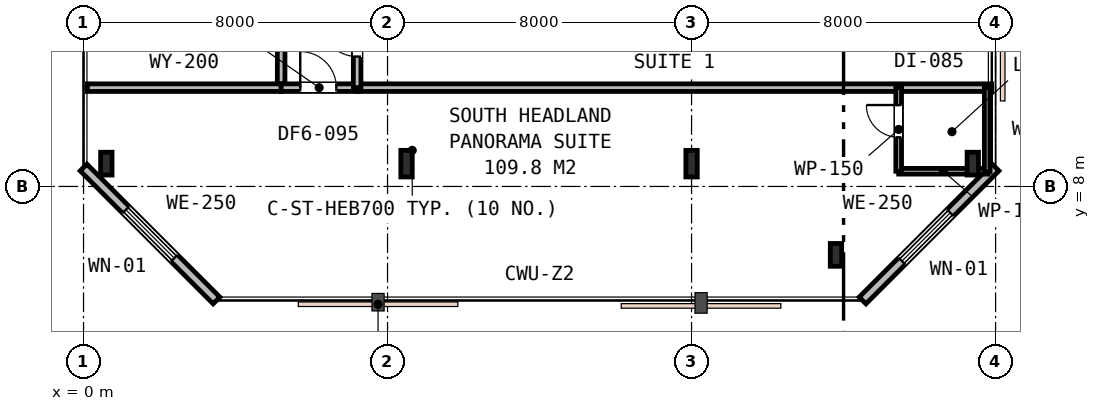
"""IFC4 building model, lengths in metres.
Left out: names, types, materials, properties, quantities, classifications, styles, units other than length and angle.
Written with IfcOpenShell. Run it as: python <this file> out.ifc"""

import sys

from ifc_helpers import new_model, si_unit, direction, frame, frame_2d, origin, origin_2d, place, context, subcontext, project, spatial, rectangle, i_section, extrude, element, fill, save


model = new_model("IFC4")
c1 = context("Model", 3, precision=1e-05, world=origin(), true_north=direction((0.0, 1.0)))
c2 = subcontext(c1, "Body", "Model", "MODEL_VIEW")
j1 = project(units=[si_unit("LENGTHUNIT", "METRE"), si_unit("PLANEANGLEUNIT", "RADIAN")], contexts=[c1])
p1 = place(None, origin())
s1 = spatial("IfcSite", under=j1, at=p1, CompositionType="ELEMENT")
p2 = place(p1, origin())
s2 = spatial("IfcBuilding", under=s1, at=p2, CompositionType="ELEMENT")
p3 = place(p2, frame((0.0, 0.0, 122.4)))
s3 = spatial("IfcBuildingStorey", under=s2, at=p3, CompositionType="ELEMENT", Elevation=122.4)
for number, where, z_axis, x_axis in (
    (1, (0.6, 8.6, 0.0), (0.0, 0.0, 1.0), (1.0, 0.0, 0.0)),
    (2, (19.8, 6.2, 0.0), (0.0, 0.0, 1.0), (1.0, 0.0, 0.0)),
    (3, (23.4, 8.6, 0.0), (0.0, 0.0, 1.0), (1.0, 0.0, 0.0)),
):
    element("IfcColumn", number, at=place(p3, frame(where, z_axis=z_axis, x_axis=x_axis)), inside=s3, PredefinedType="COLUMN", context=c2, shape_type="SweptSolid", body=[
        extrude(i_section(OverallWidth=0.3, OverallDepth=0.6, WebThickness=0.015, FlangeThickness=0.03, FilletRadius=0.027, at=origin_2d()), origin(), (0.0, 0.0, 1.0), 3.6),
    ])
for number, where, z_axis, x_axis in (
    (4, (8.5, 8.6, 0.0), (0.0, 0.0, 1.0), (1.0, 0.0, 0.0)),
    (5, (16.0, 8.6, 0.0), (0.0, 0.0, 1.0), (1.0, 0.0, 0.0)),
):
    element("IfcColumn", number, at=place(p3, frame(where, z_axis=z_axis, x_axis=x_axis)), inside=s3, PredefinedType="COLUMN", context=c2, shape_type="SweptSolid", body=[
        extrude(i_section(OverallWidth=0.3, OverallDepth=0.7, WebThickness=0.017, FlangeThickness=0.032, FilletRadius=0.027, at=origin_2d()), origin(), (0.0, 0.0, 1.0), 3.6),
    ])
p4 = place(p3, frame((20.5, 5.0, 0.0), z_axis=(0.0, 0.0, 1.0), x_axis=(0.707106781187, 0.707106781187, 0.0)))
e6 = element("IfcWall", 6, at=p4, inside=s3, PredefinedType="STANDARD", context=c2, shape_type="SweptSolid", body=[
    extrude(rectangle(XDim=4.95, YDim=0.25, at=frame_2d((2.475, 0.0))), origin(), (0.0, 0.0, 1.0), 3.33),
])
p5 = place(p4, frame((1.465, 0.0, 0.75)))
e7 = element("IfcOpeningElement", 7, at=p5, cuts=e6, PredefinedType="OPENING", context=c2, shape_type="SweptSolid", body=[
    extrude(rectangle(XDim=1.8, YDim=1.85, at=frame_2d((0.9, 0.925))), frame((0.0, 0.135, 0.0), z_axis=(0.0, -1.0, 0.0), x_axis=(1.0, 0.0, 0.0)), (0.0, 0.0, 1.0), 0.27),
])
p6 = place(p3, frame((0.0, 8.5, 0.0), z_axis=(0.0, 0.0, 1.0), x_axis=(0.707106781187, -0.707106781187, 0.0)))
e8 = element("IfcWall", 8, at=p6, inside=s3, PredefinedType="STANDARD", context=c2, shape_type="SweptSolid", body=[
    extrude(rectangle(XDim=4.95, YDim=0.25, at=frame_2d((2.475, 0.0))), origin(), (0.0, 0.0, 1.0), 3.33),
])
p7 = place(p6, frame((1.575, 0.0, 0.75)))
e9 = element("IfcOpeningElement", 9, at=p7, cuts=e8, PredefinedType="OPENING", context=c2, shape_type="SweptSolid", body=[
    extrude(rectangle(XDim=1.8, YDim=1.85, at=frame_2d((0.9, 0.925))), frame((0.0, 0.135, 0.0), z_axis=(0.0, -1.0, 0.0), x_axis=(1.0, 0.0, 0.0)), (0.0, 0.0, 1.0), 0.27),
])
p8 = place(p3, frame((5.2, 10.6, 0.0), z_axis=(0.0, 0.0, 1.0), x_axis=(0.0, 1.0, 0.0)))
e10 = element("IfcWall", 10, at=p8, inside=s3, PredefinedType="PARTITIONING", context=c2, shape_type="SweptSolid", body=[
    extrude(rectangle(XDim=20.2, YDim=0.2, at=frame_2d((10.1, 0.0))), origin(), (0.0, 0.0, 1.0), 2.87),
])
p9 = place(p8, frame((8.425, 0.0, 0.0)))
e11 = element("IfcOpeningElement", 11, at=p9, cuts=e10, PredefinedType="OPENING", context=c2, shape_type="SweptSolid", body=[
    extrude(rectangle(XDim=0.95, YDim=2.15, at=frame_2d((0.475, 1.075))), frame((0.0, 0.11, 0.0), z_axis=(0.0, -1.0, 0.0), x_axis=(1.0, 0.0, 0.0)), (0.0, 0.0, 1.0), 0.22),
])
p10 = place(p8, frame((14.68, 0.0, 0.0)))
e12 = element("IfcOpeningElement", 12, at=p10, cuts=e10, PredefinedType="OPENING", context=c2, shape_type="SweptSolid", body=[
    extrude(rectangle(XDim=0.95, YDim=2.15, at=frame_2d((0.475, 1.075))), frame((0.0, 0.11, 0.0), z_axis=(0.0, -1.0, 0.0), x_axis=(1.0, 0.0, 0.0)), (0.0, 0.0, 1.0), 0.22),
])
p11 = place(p8, frame((3.225, 0.0, 0.0)))
e13 = element("IfcOpeningElement", 13, at=p11, cuts=e10, PredefinedType="OPENING", context=c2, shape_type="SweptSolid", body=[
    extrude(rectangle(XDim=0.95, YDim=2.15, at=frame_2d((0.475, 1.075))), frame((0.0, 0.11, 0.0), z_axis=(0.0, -1.0, 0.0), x_axis=(1.0, 0.0, 0.0)), (0.0, 0.0, 1.0), 0.22),
])
p12 = place(p3, frame((0.1, 10.6, 0.0), z_axis=(0.0, 0.0, 1.0), x_axis=(1.0, 0.0, 0.0)))
e14 = element("IfcWall", 14, at=p12, inside=s3, PredefinedType="PARTITIONING", context=c2, shape_type="SweptSolid", body=[
    extrude(rectangle(XDim=5.1, YDim=0.2, at=frame_2d((2.55, 0.0))), origin(), (0.0, 0.0, 1.0), 2.96),
])
p13 = place(p3, frame((7.2, 10.6, 0.0), z_axis=(0.0, 0.0, 1.0), x_axis=(1.0, 0.0, 0.0)))
e15 = element("IfcWall", 15, at=p13, inside=s3, PredefinedType="PARTITIONING", context=c2, shape_type="SweptSolid", body=[
    extrude(rectangle(XDim=16.7, YDim=0.2, at=frame_2d((8.35, 0.0))), origin(), (0.0, 0.0, 1.0), 2.87),
])
p14 = place(p3, frame((5.2, 10.6, 0.0), z_axis=(0.0, 0.0, 1.0), x_axis=(1.0, 0.0, 0.0)))
e16 = element("IfcWall", 16, at=p14, inside=s3, PredefinedType="PARTITIONING", context=c2, shape_type="SweptSolid", body=[
    extrude(rectangle(XDim=2.0, YDim=0.2, at=frame_2d((1.0, 0.0))), origin(), (0.0, 0.0, 1.0), 3.01),
])
p15 = place(p14, frame((0.502, 0.0, 0.0)))
e17 = element("IfcOpeningElement", 17, at=p15, cuts=e16, PredefinedType="OPENING", context=c2, shape_type="SweptSolid", body=[
    extrude(rectangle(XDim=0.95, YDim=2.15, at=frame_2d((0.475, 1.075))), frame((0.0, 0.11, 0.0), z_axis=(0.0, -1.0, 0.0), x_axis=(1.0, 0.0, 0.0)), (0.0, 0.0, 1.0), 0.22),
])
p16 = place(p3, frame((21.45, 8.4, 0.0), z_axis=(0.0, 0.0, 1.0), x_axis=(1.0, 0.0, 0.0)))
e18 = element("IfcWall", 18, at=p16, inside=s3, PredefinedType="PARTITIONING", context=c2, shape_type="SweptSolid", body=[
    extrude(rectangle(XDim=2.35, YDim=0.15, at=frame_2d((1.175, 0.0))), origin(), (0.0, 0.0, 1.0), 2.87),
])
p17 = place(p3, frame((21.45, 8.4, 0.0), z_axis=(0.0, 0.0, 1.0), x_axis=(0.0, 1.0, 0.0)))
e19 = element("IfcWall", 19, at=p17, inside=s3, PredefinedType="PARTITIONING", context=c2, shape_type="SweptSolid", body=[
    extrude(rectangle(XDim=2.2, YDim=0.15, at=frame_2d((1.1, 0.0))), origin(), (0.0, 0.0, 1.0), 2.87),
])
p18 = place(p17, frame((0.892, 0.0, 0.0)))
e20 = element("IfcOpeningElement", 20, at=p18, cuts=e19, PredefinedType="OPENING", context=c2, shape_type="SweptSolid", body=[
    extrude(rectangle(XDim=0.85, YDim=2.15, at=frame_2d((0.425, 1.075))), frame((0.0, 0.085, 0.0), z_axis=(0.0, -1.0, 0.0), x_axis=(1.0, 0.0, 0.0)), (0.0, 0.0, 1.0), 0.17),
])
p19 = place(p3, frame((23.78, 10.6, 0.0), z_axis=(0.0, 0.0, 1.0), x_axis=(0.0, -1.0, 0.0)))
e21 = element("IfcWall", 21, at=p19, inside=s3, PredefinedType="PARTITIONING", context=c2, shape_type="SweptSolid", body=[
    extrude(rectangle(XDim=2.22, YDim=0.15, at=frame_2d((1.11, 0.0))), origin(), (0.0, 0.0, 1.0), 2.87),
])
p20 = place(p3, frame((7.2, 10.6, 0.0), z_axis=(0.0, 0.0, 1.0), x_axis=(0.0, 1.0, 0.0)))
e22 = element("IfcWall", 22, at=p20, inside=s3, PredefinedType="PARTITIONING", context=c2, shape_type="SweptSolid", body=[
    extrude(rectangle(XDim=18.0, YDim=0.2, at=frame_2d((9.0, 0.0))), origin(), (0.0, 0.0, 1.0), 2.87),
])
p21 = place(p20, frame((0.818, 0.0, 0.0)))
e23 = element("IfcOpeningElement", 23, at=p21, cuts=e22, PredefinedType="OPENING", context=c2, shape_type="SweptSolid", body=[
    extrude(rectangle(XDim=0.95, YDim=2.15, at=frame_2d((0.475, 1.075))), frame((0.0, 0.11, 0.0), z_axis=(0.0, -1.0, 0.0), x_axis=(1.0, 0.0, 0.0)), (0.0, 0.0, 1.0), 0.22),
])
p22 = place(p20, frame((5.169, 0.0, 0.0)))
e24 = element("IfcOpeningElement", 24, at=p22, cuts=e22, PredefinedType="OPENING", context=c2, shape_type="SweptSolid", body=[
    extrude(rectangle(XDim=0.95, YDim=2.15, at=frame_2d((0.475, 1.075))), frame((0.0, 0.11, 0.0), z_axis=(0.0, -1.0, 0.0), x_axis=(1.0, 0.0, 0.0)), (0.0, 0.0, 1.0), 0.22),
])
p23 = place(p20, frame((9.815, 0.0, 0.0)))
e25 = element("IfcOpeningElement", 25, at=p23, cuts=e22, PredefinedType="OPENING", context=c2, shape_type="SweptSolid", body=[
    extrude(rectangle(XDim=0.95, YDim=2.15, at=frame_2d((0.475, 1.075))), frame((0.0, 0.11, 0.0), z_axis=(0.0, -1.0, 0.0), x_axis=(1.0, 0.0, 0.0)), (0.0, 0.0, 1.0), 0.22),
])
p24 = place(p20, frame((15.325, 0.0, 0.0)))
e26 = element("IfcOpeningElement", 26, at=p24, cuts=e22, PredefinedType="OPENING", context=c2, shape_type="SweptSolid", body=[
    extrude(rectangle(XDim=0.95, YDim=2.15, at=frame_2d((0.475, 1.075))), frame((0.0, 0.11, 0.0), z_axis=(0.0, -1.0, 0.0), x_axis=(1.0, 0.0, 0.0)), (0.0, 0.0, 1.0), 0.22),
])
p25 = place(p5, origin())
e27 = element("IfcWindow", 27, at=p25, inside=s3, PartitioningType="SINGLE_PANEL", PredefinedType="WINDOW", context=c2, shape_type="SweptSolid", body=[
    extrude(rectangle(XDim=1.8, YDim=1.85, at=frame_2d((0.9, 0.925))), frame((0.0, 0.03, 0.0), z_axis=(0.0, -1.0, 0.0), x_axis=(1.0, 0.0, 0.0)), (0.0, 0.0, 1.0), 0.06),
])
fill(e7, e27)
p26 = place(p7, origin())
e28 = element("IfcWindow", 28, at=p26, inside=s3, PartitioningType="SINGLE_PANEL", PredefinedType="WINDOW", context=c2, shape_type="SweptSolid", body=[
    extrude(rectangle(XDim=1.8, YDim=1.85, at=frame_2d((0.9, 0.925))), frame((0.0, 0.03, 0.0), z_axis=(0.0, -1.0, 0.0), x_axis=(1.0, 0.0, 0.0)), (0.0, 0.0, 1.0), 0.06),
])
fill(e9, e28)
p27 = place(p15, origin())
e29 = element("IfcDoor", 29, at=p27, inside=s3, OperationType="SINGLE_SWING_LEFT", PredefinedType="DOOR", context=c2, shape_type="SweptSolid", body=[
    extrude(rectangle(XDim=0.95, YDim=2.15, at=frame_2d((0.475, 1.075))), frame((0.0, 0.025, 0.0), z_axis=(0.0, -1.0, 0.0), x_axis=(1.0, 0.0, 0.0)), (0.0, 0.0, 1.0), 0.05),
])
fill(e17, e29)
p28 = place(p18, origin())
e30 = element("IfcDoor", 30, at=p28, inside=s3, OperationType="SINGLE_SWING_RIGHT", PredefinedType="DOOR", context=c2, shape_type="SweptSolid", body=[
    extrude(rectangle(XDim=0.85, YDim=2.15, at=frame_2d((0.425, 1.075))), frame((0.0, 0.025, 0.0), z_axis=(0.0, -1.0, 0.0), x_axis=(1.0, 0.0, 0.0)), (0.0, 0.0, 1.0), 0.05),
])
fill(e20, e30)
p29 = place(p21, origin())
e31 = element("IfcDoor", 31, at=p29, inside=s3, OperationType="SINGLE_SWING_RIGHT", PredefinedType="DOOR", context=c2, shape_type="SweptSolid", body=[
    extrude(rectangle(XDim=0.95, YDim=2.15, at=frame_2d((0.475, 1.075))), frame((0.0, 0.025, 0.0), z_axis=(0.0, -1.0, 0.0), x_axis=(1.0, 0.0, 0.0)), (0.0, 0.0, 1.0), 0.05),
])
fill(e23, e31)
save(model, sys.argv[1])
